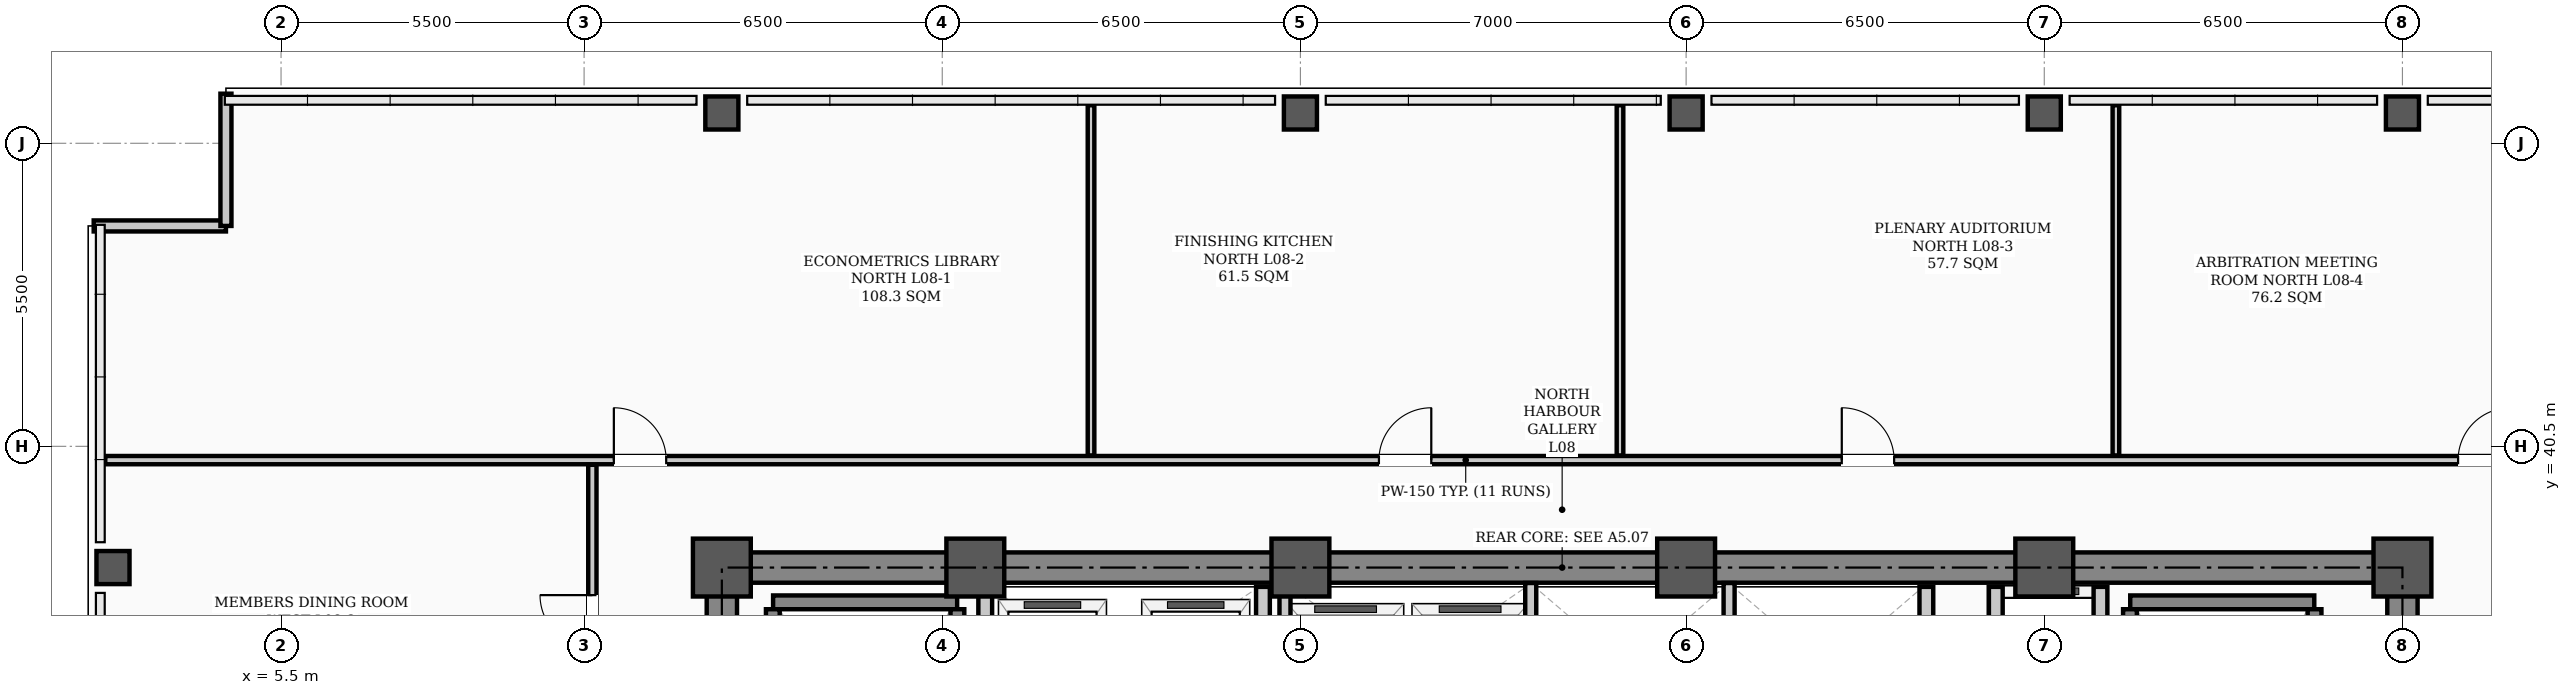
"""IFC4 building model, lengths in metres.
Left out: names, types, materials, properties, quantities, classifications, styles, units other than length and angle.
Written with IfcOpenShell. Run it as: python <this file> out.ifc"""

import sys

from ifc_helpers import new_model, si_unit, direction, frame, frame_2d, origin, origin_2d, place, context, subcontext, project, spatial, rectangle, hollow_rectangle, extrude, element, fill, save


model = new_model("IFC4")
c1 = context("Model", 3, precision=1e-05, world=origin(), true_north=direction((0.0, 1.0)))
c2 = subcontext(c1, "Body", "Model", "MODEL_VIEW")
j1 = project(units=[si_unit("LENGTHUNIT", "METRE"), si_unit("PLANEANGLEUNIT", "RADIAN")], contexts=[c1])
p1 = place(None, origin())
s1 = spatial("IfcSite", under=j1, at=p1, CompositionType="ELEMENT")
p2 = place(p1, origin())
s2 = spatial("IfcBuilding", under=s1, at=p2, CompositionType="ELEMENT")
p3 = place(p2, frame((0.0, 0.0, 34.3)))
s3 = spatial("IfcBuildingStorey", under=s2, at=p3, CompositionType="ELEMENT", Elevation=34.3)
for number, where, z_axis, x_axis in (
    (1, (13.5, 38.3, 0.0), (0.0, 0.0, 1.0), (1.0, 0.0, 0.0)),
    (2, (18.1, 38.3, 0.0), (0.0, 0.0, 1.0), (1.0, 0.0, 0.0)),
    (3, (24.0, 38.3, 0.0), (0.0, 0.0, 1.0), (1.0, 0.0, 0.0)),
    (4, (31.0, 38.3, 0.0), (0.0, 0.0, 1.0), (1.0, 0.0, 0.0)),
    (5, (37.5, 38.3, 0.0), (0.0, 0.0, 1.0), (1.0, 0.0, 0.0)),
    (6, (44.0, 38.3, 0.0), (0.0, 0.0, 1.0), (1.0, 0.0, 0.0)),
):
    element("IfcColumn", number, at=place(p3, frame(where, z_axis=z_axis, x_axis=x_axis)), inside=s3, PredefinedType="COLUMN", context=c2, shape_type="SweptSolid", body=[
        extrude(hollow_rectangle(XDim=1.05, YDim=1.05, WallThickness=0.038, InnerFilletRadius=0.019, OuterFilletRadius=0.057, at=origin_2d()), origin(), (0.0, 0.0, 1.0), 3.9),
    ])
for number, where, z_axis, x_axis in (
    (7, (2.45, 38.3, 0.0), (0.0, 0.0, 1.0), (1.0, 0.0, 0.0)),
    (8, (13.5, 46.55, 0.0), (0.0, 0.0, 1.0), (1.0, 0.0, 0.0)),
    (9, (24.0, 46.55, 0.0), (0.0, 0.0, 1.0), (1.0, 0.0, 0.0)),
    (10, (31.0, 46.55, 0.0), (0.0, 0.0, 1.0), (1.0, 0.0, 0.0)),
    (11, (37.5, 46.55, 0.0), (0.0, 0.0, 1.0), (1.0, 0.0, 0.0)),
    (12, (44.0, 46.55, 0.0), (0.0, 0.0, 1.0), (1.0, 0.0, 0.0)),
):
    element("IfcColumn", number, at=place(p3, frame(where, z_axis=z_axis, x_axis=x_axis)), inside=s3, PredefinedType="COLUMN", context=c2, shape_type="SweptSolid", body=[
        extrude(hollow_rectangle(XDim=0.6, YDim=0.6, WallThickness=0.026, InnerFilletRadius=0.013, OuterFilletRadius=0.039, at=origin_2d()), origin(), (0.0, 0.0, 1.0), 3.9),
    ])
for number, where, z_axis, x_axis in (
    (13, (2.1, 44.5, 0.0), (0.0, 0.0, 1.0), (1.0, 0.0, 0.0)),
    (14, (4.5, 44.5, 0.0), (0.0, 0.0, 1.0), (0.0, 1.0, 0.0)),
):
    element("IfcWall", number, at=place(p3, frame(where, z_axis=z_axis, x_axis=x_axis)), inside=s3, PredefinedType="PARAPET", context=c2, shape_type="SweptSolid", body=[
        extrude(rectangle(XDim=2.4, YDim=0.2, at=frame_2d((1.2, 0.0))), origin(), (0.0, 0.0, 1.0), 1.2),
    ])
p4 = place(p3, frame((13.5, 38.3, 0.0), z_axis=(0.0, 0.0, 1.0), x_axis=(1.0, 0.0, 0.0)))
e15 = element("IfcWall", 15, at=p4, inside=s3, PredefinedType="SHEAR", context=c2, shape_type="SweptSolid", body=[
    extrude(rectangle(XDim=30.5, YDim=0.55, at=frame_2d((15.25, 0.0))), origin(), (0.0, 0.0, 1.0), 3.72),
])
for number, where, z_axis, x_axis in (
    (16, (13.5, 29.35, 0.0), (0.0, 0.0, 1.0), (0.0, 1.0, 0.0)),
    (17, (44.0, 29.35, 0.0), (0.0, 0.0, 1.0), (0.0, 1.0, 0.0)),
):
    element("IfcWall", number, at=place(p3, frame(where, z_axis=z_axis, x_axis=x_axis)), inside=s3, PredefinedType="SHEAR", context=c2, shape_type="SweptSolid", body=[
        extrude(rectangle(XDim=8.6, YDim=0.55, at=frame_2d((4.3, 0.0))), origin(), (0.0, 0.0, 1.0), 3.72),
    ])
p5 = place(p3, frame((14.43, 37.669, 0.0), z_axis=(0.0, 0.0, 1.0), x_axis=(1.0, 0.0, 0.0)))
e18 = element("IfcWall", 18, at=p5, inside=s3, PredefinedType="STANDARD", context=c2, shape_type="SweptSolid", body=[
    extrude(rectangle(XDim=3.34, YDim=0.25, at=frame_2d((1.67, 0.0))), origin(), (0.0, 0.0, 1.0), 3.72),
])
for number, where, z_axis, x_axis in (
    (19, (14.425, 30.36, 0.0), (0.0, 0.0, 1.0), (0.0, 1.0, 0.0)),
    (20, (17.775, 30.36, 0.0), (0.0, 0.0, 1.0), (0.0, 1.0, 0.0)),
):
    element("IfcWall", number, at=place(p3, frame(where, z_axis=z_axis, x_axis=x_axis)), inside=s3, PredefinedType="STANDARD", context=c2, shape_type="SweptSolid", body=[
        extrude(rectangle(XDim=7.184, YDim=0.25, at=frame_2d((3.592, 0.0))), origin(), (0.0, 0.0, 1.0), 3.72),
    ])
p6 = place(p3, frame((39.06, 37.669, 0.0), z_axis=(0.0, 0.0, 1.0), x_axis=(1.0, 0.0, 0.0)))
e21 = element("IfcWall", 21, at=p6, inside=s3, PredefinedType="STANDARD", context=c2, shape_type="SweptSolid", body=[
    extrude(rectangle(XDim=3.34, YDim=0.25, at=frame_2d((1.67, 0.0))), origin(), (0.0, 0.0, 1.0), 3.72),
])
for number, where, z_axis, x_axis in (
    (22, (39.055, 30.36, 0.0), (0.0, 0.0, 1.0), (0.0, 1.0, 0.0)),
    (23, (42.405, 30.36, 0.0), (0.0, 0.0, 1.0), (0.0, 1.0, 0.0)),
):
    element("IfcWall", number, at=place(p3, frame(where, z_axis=z_axis, x_axis=x_axis)), inside=s3, PredefinedType="STANDARD", context=c2, shape_type="SweptSolid", body=[
        extrude(rectangle(XDim=7.184, YDim=0.25, at=frame_2d((3.592, 0.0))), origin(), (0.0, 0.0, 1.0), 3.72),
    ])
p7 = place(p3, frame((36.62, 31.95, 0.0), z_axis=(0.0, 0.0, 1.0), x_axis=(0.0, 1.0, 0.0)))
e24 = element("IfcWall", 24, at=p7, inside=s3, PredefinedType="STANDARD", context=c2, shape_type="SweptSolid", body=[
    extrude(rectangle(XDim=6.0, YDim=0.25, at=frame_2d((3.0, 0.0))), origin(), (0.0, 0.0, 1.0), 3.3),
])
p8 = place(p7, frame((0.9, 0.0, 0.0)))
e25 = element("IfcOpeningElement", 25, at=p8, cuts=e24, PredefinedType="OPENING", context=c2, shape_type="SweptSolid", body=[
    extrude(rectangle(XDim=1.1, YDim=2.08, at=frame_2d((0.55, 1.04))), frame((0.0, 0.135, 0.0), z_axis=(0.0, -1.0, 0.0), x_axis=(1.0, 0.0, 0.0)), (0.0, 0.0, 1.0), 0.27),
])
p9 = place(p7, frame((4.0, 0.0, 0.0)))
e26 = element("IfcOpeningElement", 26, at=p9, cuts=e24, PredefinedType="OPENING", context=c2, shape_type="SweptSolid", body=[
    extrude(rectangle(XDim=1.1, YDim=2.08, at=frame_2d((0.55, 1.04))), frame((0.0, 0.135, 0.0), z_axis=(0.0, -1.0, 0.0), x_axis=(1.0, 0.0, 0.0)), (0.0, 0.0, 1.0), 0.27),
])
p10 = place(p3, frame((38.52, 31.95, 0.0), z_axis=(0.0, 0.0, 1.0), x_axis=(0.0, 1.0, 0.0)))
e27 = element("IfcWall", 27, at=p10, inside=s3, PredefinedType="STANDARD", context=c2, shape_type="SweptSolid", body=[
    extrude(rectangle(XDim=6.0, YDim=0.25, at=frame_2d((3.0, 0.0))), origin(), (0.0, 0.0, 1.0), 3.3),
])
for number, where, z_axis, x_axis in (
    (28, (18.28, 34.62, 0.0), (0.0, 0.0, 1.0), (0.0, 1.0, 0.0)),
    (29, (23.32, 34.62, 0.0), (0.0, 0.0, 1.0), (0.0, 1.0, 0.0)),
):
    element("IfcWall", number, at=place(p3, frame(where, z_axis=z_axis, x_axis=x_axis)), inside=s3, PredefinedType="STANDARD", context=c2, shape_type="SweptSolid", body=[
        extrude(rectangle(XDim=3.33, YDim=0.25, at=frame_2d((1.665, 0.0))), origin(), (0.0, 0.0, 1.0), 3.3),
    ])
p11 = place(p3, frame((35.36, 34.9, 0.0), z_axis=(0.0, 0.0, 1.0), x_axis=(0.0, 1.0, 0.0)))
e30 = element("IfcWall", 30, at=p11, inside=s3, PredefinedType="STANDARD", context=c2, shape_type="SweptSolid", body=[
    extrude(rectangle(XDim=3.05, YDim=0.25, at=frame_2d((1.525, 0.0))), origin(), (0.0, 0.0, 1.0), 3.3),
])
p12 = place(p3, frame((2.31, 40.25, 0.0), z_axis=(0.0, 0.0, 1.0), x_axis=(1.0, 0.0, 0.0)))
e31 = element("IfcWall", 31, at=p12, inside=s3, PredefinedType="PARTITIONING", context=c2, shape_type="SweptSolid", body=[
    extrude(rectangle(XDim=49.38, YDim=0.15, at=frame_2d((24.69, 0.0))), origin(), (0.0, 0.0, 1.0), 3.1),
])
p13 = place(p12, frame((9.23, 0.0, 0.0)))
e32 = element("IfcOpeningElement", 32, at=p13, cuts=e31, PredefinedType="OPENING", context=c2, shape_type="SweptSolid", body=[
    extrude(rectangle(XDim=0.95, YDim=2.08, at=frame_2d((0.475, 1.04))), frame((0.0, 0.085, 0.0), z_axis=(0.0, -1.0, 0.0), x_axis=(1.0, 0.0, 0.0)), (0.0, 0.0, 1.0), 0.17),
])
p14 = place(p12, frame((23.115, 0.0, 0.0)))
e33 = element("IfcOpeningElement", 33, at=p14, cuts=e31, PredefinedType="OPENING", context=c2, shape_type="SweptSolid", body=[
    extrude(rectangle(XDim=0.95, YDim=2.08, at=frame_2d((0.475, 1.04))), frame((0.0, 0.085, 0.0), z_axis=(0.0, -1.0, 0.0), x_axis=(1.0, 0.0, 0.0)), (0.0, 0.0, 1.0), 0.17),
])
p15 = place(p12, frame((31.515, 0.0, 0.0)))
e34 = element("IfcOpeningElement", 34, at=p15, cuts=e31, PredefinedType="OPENING", context=c2, shape_type="SweptSolid", body=[
    extrude(rectangle(XDim=0.95, YDim=2.08, at=frame_2d((0.475, 1.04))), frame((0.0, 0.085, 0.0), z_axis=(0.0, -1.0, 0.0), x_axis=(1.0, 0.0, 0.0)), (0.0, 0.0, 1.0), 0.17),
])
p16 = place(p12, frame((42.7, 0.0, 0.0)))
e35 = element("IfcOpeningElement", 35, at=p16, cuts=e31, PredefinedType="OPENING", context=c2, shape_type="SweptSolid", body=[
    extrude(rectangle(XDim=0.95, YDim=2.08, at=frame_2d((0.475, 1.04))), frame((0.0, 0.085, 0.0), z_axis=(0.0, -1.0, 0.0), x_axis=(1.0, 0.0, 0.0)), (0.0, 0.0, 1.0), 0.17),
])
p17 = place(p3, frame((11.15, 17.635, 0.0), z_axis=(0.0, 0.0, 1.0), x_axis=(0.0, 1.0, 0.0)))
e36 = element("IfcWall", 36, at=p17, inside=s3, PredefinedType="PARTITIONING", context=c2, shape_type="SweptSolid", body=[
    extrude(rectangle(XDim=22.53, YDim=0.15, at=frame_2d((11.265, 0.0))), origin(), (0.0, 0.0, 1.0), 3.0),
])
p18 = place(p17, frame((4.565, 0.0, 0.0)))
e37 = element("IfcOpeningElement", 37, at=p18, cuts=e36, PredefinedType="OPENING", context=c2, shape_type="SweptSolid", body=[
    extrude(rectangle(XDim=0.95, YDim=2.08, at=frame_2d((0.475, 1.04))), frame((0.0, 0.085, 0.0), z_axis=(0.0, -1.0, 0.0), x_axis=(1.0, 0.0, 0.0)), (0.0, 0.0, 1.0), 0.17),
])
p19 = place(p17, frame((12.99, 0.0, 0.0)))
e38 = element("IfcOpeningElement", 38, at=p19, cuts=e36, PredefinedType="OPENING", context=c2, shape_type="SweptSolid", body=[
    extrude(rectangle(XDim=0.95, YDim=2.08, at=frame_2d((0.475, 1.04))), frame((0.0, 0.085, 0.0), z_axis=(0.0, -1.0, 0.0), x_axis=(1.0, 0.0, 0.0)), (0.0, 0.0, 1.0), 0.17),
])
p20 = place(p17, frame((19.215, 0.0, 0.0)))
e39 = element("IfcOpeningElement", 39, at=p20, cuts=e36, PredefinedType="OPENING", context=c2, shape_type="SweptSolid", body=[
    extrude(rectangle(XDim=0.95, YDim=2.08, at=frame_2d((0.475, 1.04))), frame((0.0, 0.085, 0.0), z_axis=(0.0, -1.0, 0.0), x_axis=(1.0, 0.0, 0.0)), (0.0, 0.0, 1.0), 0.17),
])
for number, where, z_axis, x_axis in (
    (40, (20.2, 40.335, 0.0), (0.0, 0.0, 1.0), (0.0, 1.0, 0.0)),
    (41, (29.8, 40.335, 0.0), (0.0, 0.0, 1.0), (0.0, 1.0, 0.0)),
    (42, (38.8, 40.335, 0.0), (0.0, 0.0, 1.0), (0.0, 1.0, 0.0)),
):
    element("IfcWall", number, at=place(p3, frame(where, z_axis=z_axis, x_axis=x_axis)), inside=s3, PredefinedType="PARTITIONING", context=c2, shape_type="SweptSolid", body=[
        extrude(rectangle(XDim=6.355, YDim=0.12, at=frame_2d((3.177, 0.0))), origin(), (0.0, 0.0, 1.0), 3.212),
    ])
p21 = place(p3, frame((23.72, 34.9, 0.0), z_axis=(0.0, 0.0, 1.0), x_axis=(0.0, 1.0, 0.0)))
e43 = element("IfcWall", 43, at=p21, inside=s3, PredefinedType="STANDARD", context=c2, shape_type="SweptSolid", body=[
    extrude(rectangle(XDim=3.12, YDim=0.2, at=frame_2d((1.56, 0.0))), origin(), (0.0, 0.0, 1.0), 3.1),
])
for number, where, z_axis, x_axis in (
    (44, (28.18, 34.9, 0.0), (0.0, 0.0, 1.0), (0.0, 1.0, 0.0)),
    (45, (31.78, 34.9, 0.0), (0.0, 0.0, 1.0), (0.0, 1.0, 0.0)),
):
    element("IfcWall", number, at=place(p3, frame(where, z_axis=z_axis, x_axis=x_axis)), inside=s3, PredefinedType="STANDARD", context=c2, shape_type="SweptSolid", body=[
        extrude(rectangle(XDim=3.12, YDim=0.2, at=frame_2d((1.56, 0.0))), origin(), (0.0, 0.0, 1.0), 3.3),
    ])
p22 = place(p20, origin())
e46 = element("IfcDoor", 46, at=p22, inside=s3, OperationType="SINGLE_SWING_RIGHT", PredefinedType="DOOR", context=c2, shape_type="SweptSolid", body=[
    extrude(rectangle(XDim=0.95, YDim=2.08, at=frame_2d((0.475, 1.04))), frame((0.0, 0.025, 0.0), z_axis=(0.0, -1.0, 0.0), x_axis=(1.0, 0.0, 0.0)), (0.0, 0.0, 1.0), 0.05),
])
fill(e39, e46)
p23 = place(p13, origin())
e47 = element("IfcDoor", 47, at=p23, inside=s3, OperationType="SINGLE_SWING_LEFT", PredefinedType="DOOR", context=c2, shape_type="SweptSolid", body=[
    extrude(rectangle(XDim=0.95, YDim=2.08, at=frame_2d((0.475, 1.04))), frame((0.0, 0.025, 0.0), z_axis=(0.0, -1.0, 0.0), x_axis=(1.0, 0.0, 0.0)), (0.0, 0.0, 1.0), 0.05),
])
fill(e32, e47)
p24 = place(p14, origin())
e48 = element("IfcDoor", 48, at=p24, inside=s3, OperationType="SINGLE_SWING_RIGHT", PredefinedType="DOOR", context=c2, shape_type="SweptSolid", body=[
    extrude(rectangle(XDim=0.95, YDim=2.08, at=frame_2d((0.475, 1.04))), frame((0.0, 0.025, 0.0), z_axis=(0.0, -1.0, 0.0), x_axis=(1.0, 0.0, 0.0)), (0.0, 0.0, 1.0), 0.05),
])
fill(e33, e48)
p25 = place(p15, origin())
e49 = element("IfcDoor", 49, at=p25, inside=s3, OperationType="SINGLE_SWING_LEFT", PredefinedType="DOOR", context=c2, shape_type="SweptSolid", body=[
    extrude(rectangle(XDim=0.95, YDim=2.08, at=frame_2d((0.475, 1.04))), frame((0.0, 0.025, 0.0), z_axis=(0.0, -1.0, 0.0), x_axis=(1.0, 0.0, 0.0)), (0.0, 0.0, 1.0), 0.05),
])
fill(e34, e49)
p26 = place(p16, origin())
e50 = element("IfcDoor", 50, at=p26, inside=s3, OperationType="SINGLE_SWING_RIGHT", PredefinedType="DOOR", context=c2, shape_type="SweptSolid", body=[
    extrude(rectangle(XDim=0.95, YDim=2.08, at=frame_2d((0.475, 1.04))), frame((0.0, 0.025, 0.0), z_axis=(0.0, -1.0, 0.0), x_axis=(1.0, 0.0, 0.0)), (0.0, 0.0, 1.0), 0.05),
])
fill(e35, e50)
save(model, sys.argv[1])
